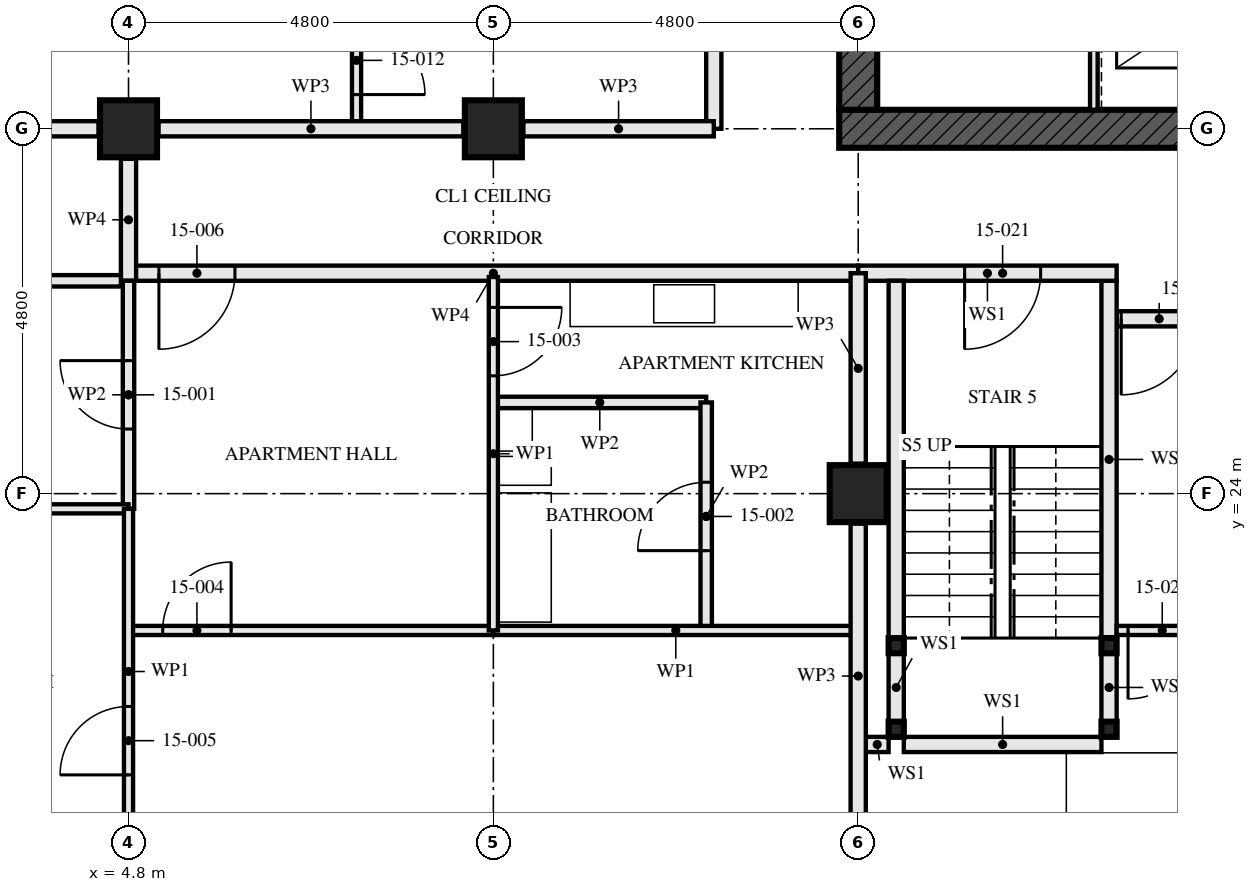
"""IFC4 building model, lengths in metres.
Left out: names, types, materials, properties, quantities, classifications, styles, units other than length and angle.
Written with IfcOpenShell. Run it as: python <this file> out.ifc"""

import sys

from ifc_helpers import new_model, si_unit, direction, frame, frame_2d, origin, origin_2d, place, context, subcontext, project, spatial, rectangle, hollow_rectangle, extrude, element, fill, save


model = new_model("IFC4")
c1 = context("Model", 3, precision=1e-05, world=origin(), true_north=direction((0.0, 1.0)))
c2 = subcontext(c1, "Body", "Model", "MODEL_VIEW")
j1 = project(units=[si_unit("LENGTHUNIT", "METRE"), si_unit("PLANEANGLEUNIT", "RADIAN")], contexts=[c1])
p1 = place(None, origin())
s1 = spatial("IfcSite", under=j1, at=p1, CompositionType="ELEMENT")
p2 = place(p1, origin())
s2 = spatial("IfcBuilding", under=s1, at=p2, CompositionType="ELEMENT")
p3 = place(p2, frame((0.0, 0.0, 58.5)))
s3 = spatial("IfcBuildingStorey", under=s2, at=p3, CompositionType="ELEMENT", Elevation=58.5)
for number, where, z_axis, x_axis in (
    (1, (4.8, 28.8, 0.0), (0.0, 0.0, 1.0), (0.0, 1.0, 0.0)),
    (2, (9.6, 28.8, 0.0), (0.0, 0.0, 1.0), (0.0, 1.0, 0.0)),
    (3, (14.4, 24.0, 0.0), (0.0, 0.0, 1.0), (1.0, 0.0, 0.0)),
):
    element("IfcColumn", number, at=place(p3, frame(where, z_axis=z_axis, x_axis=x_axis)), inside=s3, PredefinedType="COLUMN", context=c2, shape_type="SweptSolid", body=[
        extrude(hollow_rectangle(XDim=0.75, YDim=0.75, WallThickness=0.08, at=origin_2d()), origin(), (0.0, 0.0, 1.0), 3.5),
    ])
p4 = place(p3, frame((14.15, 28.8, -0.17), z_axis=(0.0, 0.0, 1.0), x_axis=(1.0, 0.0, 0.0)))
e4 = element("IfcWall", 4, at=p4, inside=s3, PredefinedType="SHEAR", context=c2, shape_type="SweptSolid", body=[
    extrude(rectangle(XDim=14.9, YDim=0.5, at=frame_2d((7.45, 0.0))), origin(), (0.0, 0.0, 1.0), 3.5),
])
p5 = place(p4, frame((6.85, 0.0, 0.17)))
e5 = element("IfcOpeningElement", 5, at=p5, cuts=e4, PredefinedType="OPENING", context=c2, shape_type="SweptSolid", body=[
    extrude(rectangle(XDim=1.2, YDim=2.1, at=frame_2d((0.6, 1.05))), frame((0.0, 0.26, 0.0), z_axis=(0.0, -1.0, 0.0), x_axis=(1.0, 0.0, 0.0)), (0.0, 0.0, 1.0), 0.521),
])
p6 = place(p3, frame((14.4, 42.95, -0.17), z_axis=(0.0, 0.0, 1.0), x_axis=(0.0, -1.0, 0.0)))
e6 = element("IfcWall", 6, at=p6, inside=s3, PredefinedType="SHEAR", context=c2, shape_type="SweptSolid", body=[
    extrude(rectangle(XDim=13.9, YDim=0.5, at=frame_2d((6.95, 0.0))), origin(), (0.0, 0.0, 1.0), 3.5),
])
p7 = place(p6, frame((6.35, 0.0, 0.17)))
e7 = element("IfcOpeningElement", 7, at=p7, cuts=e6, PredefinedType="OPENING", context=c2, shape_type="SweptSolid", body=[
    extrude(rectangle(XDim=1.2, YDim=2.1, at=frame_2d((0.6, 1.05))), frame((0.0, 0.26, 0.0), z_axis=(0.0, -1.0, 0.0), x_axis=(1.0, 0.0, 0.0)), (0.0, 0.0, 1.0), 0.521),
])
for number, where, z_axis, x_axis in (
    (8, (14.9, 20.9, 0.0), (0.0, 0.0, 1.0), (1.0, 0.0, 0.0)),
    (9, (17.7, 20.9, 0.0), (0.0, 0.0, 1.0), (1.0, 0.0, 0.0)),
    (10, (14.9, 22.0, 0.0), (0.0, 0.0, 1.0), (1.0, 0.0, 0.0)),
    (11, (17.7, 22.0, 0.0), (0.0, 0.0, 1.0), (1.0, 0.0, 0.0)),
):
    element("IfcColumn", number, at=place(p3, frame(where, z_axis=z_axis, x_axis=x_axis)), inside=s3, PredefinedType="COLUMN", context=c2, shape_type="SweptSolid", body=[
        extrude(hollow_rectangle(XDim=0.2, YDim=0.2, WallThickness=0.008, at=origin_2d()), origin(), (0.0, 0.0, 1.0), 3.33),
    ])
p8 = place(p3, frame((4.8, 23.8, 0.0), z_axis=(0.0, 0.0, 1.0), x_axis=(0.0, 1.0, 0.0)))
e12 = element("IfcWall", 12, at=p8, inside=s3, PredefinedType="PARTITIONING", context=c2, shape_type="SweptSolid", body=[
    extrude(rectangle(XDim=3.0, YDim=0.15, at=frame_2d((1.5, 0.0))), origin(), (0.0, 0.0, 1.0), 2.55),
])
p9 = place(p8, frame((1.05, 0.0, 0.0)))
e13 = element("IfcOpeningElement", 13, at=p9, cuts=e12, PredefinedType="OPENING", context=c2, shape_type="SweptSolid", body=[
    extrude(rectangle(XDim=0.9, YDim=2.1, at=frame_2d((0.45, 1.05))), frame((0.0, 0.085, 0.0), z_axis=(0.0, -1.0, 0.0), x_axis=(1.0, 0.0, 0.0)), (0.0, 0.0, 1.0), 0.171),
])
p10 = place(p3, frame((12.4, 22.2, 0.0), z_axis=(0.0, 0.0, 1.0), x_axis=(0.0, 1.0, 0.0)))
e14 = element("IfcWall", 14, at=p10, inside=s3, PredefinedType="PARTITIONING", context=c2, shape_type="SweptSolid", body=[
    extrude(rectangle(XDim=3.0, YDim=0.15, at=frame_2d((1.5, 0.0))), origin(), (0.0, 0.0, 1.0), 2.55),
])
p11 = place(p10, frame((1.05, 0.0, 0.0)))
e15 = element("IfcOpeningElement", 15, at=p11, cuts=e14, PredefinedType="OPENING", context=c2, shape_type="SweptSolid", body=[
    extrude(rectangle(XDim=0.9, YDim=2.1, at=frame_2d((0.45, 1.05))), frame((0.0, 0.085, 0.0), z_axis=(0.0, -1.0, 0.0), x_axis=(1.0, 0.0, 0.0)), (0.0, 0.0, 1.0), 0.171),
])
p12 = place(p3, frame((9.6, 25.2, 0.0), z_axis=(0.0, 0.0, 1.0), x_axis=(1.0, 0.0, 0.0)))
e16 = element("IfcWall", 16, at=p12, inside=s3, PredefinedType="PARTITIONING", context=c2, shape_type="SweptSolid", body=[
    extrude(rectangle(XDim=2.8, YDim=0.15, at=frame_2d((1.4, 0.0))), origin(), (0.0, 0.0, 1.0), 3.33),
])
p13 = place(p3, frame((9.6, 22.2, 0.0), z_axis=(0.0, 0.0, 1.0), x_axis=(0.0, 1.0, 0.0)))
e17 = element("IfcWall", 17, at=p13, inside=s3, PredefinedType="PARTITIONING", context=c2, shape_type="SweptSolid", body=[
    extrude(rectangle(XDim=4.65, YDim=0.12, at=frame_2d((2.325, 0.0))), origin(), (0.0, 0.0, 1.0), 2.55),
])
p14 = place(p13, frame((3.35, 0.0, 0.0)))
e18 = element("IfcOpeningElement", 18, at=p14, cuts=e17, PredefinedType="OPENING", context=c2, shape_type="SweptSolid", body=[
    extrude(rectangle(XDim=0.9, YDim=2.1, at=frame_2d((0.45, 1.05))), frame((0.0, 0.071, 0.0), z_axis=(0.0, -1.0, 0.0), x_axis=(1.0, 0.0, 0.0)), (0.0, 0.0, 1.0), 0.141),
])
p15 = place(p3, frame((0.244, 23.8, 0.0), z_axis=(0.0, 0.0, 1.0), x_axis=(1.0, 0.0, 0.0)))
e19 = element("IfcWall", 19, at=p15, inside=s3, PredefinedType="PARTITIONING", context=c2, shape_type="SweptSolid", body=[
    extrude(rectangle(XDim=4.556, YDim=0.12, at=frame_2d((2.278, 0.0))), origin(), (0.0, 0.0, 1.0), 3.33),
])
p16 = place(p3, frame((4.8, 22.2, 0.0), z_axis=(0.0, 0.0, 1.0), x_axis=(1.0, 0.0, 0.0)))
e20 = element("IfcWall", 20, at=p16, inside=s3, PredefinedType="PARTITIONING", context=c2, shape_type="SweptSolid", body=[
    extrude(rectangle(XDim=4.8, YDim=0.12, at=frame_2d((2.4, 0.0))), origin(), (0.0, 0.0, 1.0), 3.33),
])
p17 = place(p16, frame((0.45, 0.0, 0.0)))
e21 = element("IfcOpeningElement", 21, at=p17, cuts=e20, PredefinedType="OPENING", context=c2, shape_type="SweptSolid", body=[
    extrude(rectangle(XDim=0.9, YDim=2.1, at=frame_2d((0.45, 1.05))), frame((0.0, 0.071, 0.0), z_axis=(0.0, -1.0, 0.0), x_axis=(1.0, 0.0, 0.0)), (0.0, 0.0, 1.0), 0.141),
])
p18 = place(p3, frame((9.6, 22.2, 0.0), z_axis=(0.0, 0.0, 1.0), x_axis=(1.0, 0.0, 0.0)))
e22 = element("IfcWall", 22, at=p18, inside=s3, PredefinedType="PARTITIONING", context=c2, shape_type="SweptSolid", body=[
    extrude(rectangle(XDim=4.8, YDim=0.12, at=frame_2d((2.4, 0.0))), origin(), (0.0, 0.0, 1.0), 3.33),
])
p19 = place(p3, frame((4.8, 19.52, 0.0), z_axis=(0.0, 0.0, 1.0), x_axis=(0.0, 1.0, 0.0)))
e23 = element("IfcWall", 23, at=p19, inside=s3, PredefinedType="PARTITIONING", context=c2, shape_type="SweptSolid", body=[
    extrude(rectangle(XDim=4.28, YDim=0.12, at=frame_2d((2.14, 0.0))), origin(), (0.0, 0.0, 1.0), 3.33),
])
p20 = place(p19, frame((0.78, 0.0, 0.0)))
e24 = element("IfcOpeningElement", 24, at=p20, cuts=e23, PredefinedType="OPENING", context=c2, shape_type="SweptSolid", body=[
    extrude(rectangle(XDim=0.9, YDim=2.1, at=frame_2d((0.45, 1.05))), frame((0.0, 0.071, 0.0), z_axis=(0.0, -1.0, 0.0), x_axis=(1.0, 0.0, 0.0)), (0.0, 0.0, 1.0), 0.141),
])
p21 = place(p3, frame((4.8, 26.9, 0.0), z_axis=(0.0, 0.0, 1.0), x_axis=(1.0, 0.0, 0.0)))
e25 = element("IfcWall", 25, at=p21, inside=s3, PredefinedType="PARTITIONING", context=c2, shape_type="SweptSolid", body=[
    extrude(rectangle(XDim=9.6, YDim=0.2, at=frame_2d((4.8, 0.0))), origin(), (0.0, 0.0, 1.0), 3.33),
])
p22 = place(p21, frame((0.4, 0.0, 0.0)))
e26 = element("IfcOpeningElement", 26, at=p22, cuts=e25, PredefinedType="OPENING", context=c2, shape_type="SweptSolid", body=[
    extrude(rectangle(XDim=1.0, YDim=2.1, at=frame_2d((0.5, 1.05))), frame((0.0, 0.111, 0.0), z_axis=(0.0, -1.0, 0.0), x_axis=(1.0, 0.0, 0.0)), (0.0, 0.0, 1.0), 0.221),
])
p23 = place(p3, frame((4.8, 26.8, 0.0), z_axis=(0.0, 0.0, 1.0), x_axis=(0.0, 1.0, 0.0)))
e27 = element("IfcWall", 27, at=p23, inside=s3, PredefinedType="PARTITIONING", context=c2, shape_type="SweptSolid", body=[
    extrude(rectangle(XDim=1.605, YDim=0.2, at=frame_2d((0.802, 0.0))), origin(), (0.0, 0.0, 1.0), 3.33),
])
p24 = place(p3, frame((7.8, 33.6, 0.0), z_axis=(0.0, 0.0, 1.0), x_axis=(0.0, -1.0, 0.0)))
e28 = element("IfcWall", 28, at=p24, inside=s3, PredefinedType="PARTITIONING", context=c2, shape_type="SweptSolid", body=[
    extrude(rectangle(XDim=4.8, YDim=0.12, at=frame_2d((2.4, 0.0))), origin(), (0.0, 0.0, 1.0), 3.33),
])
p25 = place(p24, frame((3.45, 0.0, 0.0)))
e29 = element("IfcOpeningElement", 29, at=p25, cuts=e28, PredefinedType="OPENING", context=c2, shape_type="SweptSolid", body=[
    extrude(rectangle(XDim=0.9, YDim=2.1, at=frame_2d((0.45, 1.05))), frame((0.0, 0.071, 0.0), z_axis=(0.0, -1.0, 0.0), x_axis=(1.0, 0.0, 0.0)), (0.0, 0.0, 1.0), 0.141),
])
p26 = place(p3, frame((12.5, 43.2, 0.0), z_axis=(0.0, 0.0, 1.0), x_axis=(0.0, -1.0, 0.0)))
e30 = element("IfcWall", 30, at=p26, inside=s3, PredefinedType="PARTITIONING", context=c2, shape_type="SweptSolid", body=[
    extrude(rectangle(XDim=14.4, YDim=0.2, at=frame_2d((7.2, 0.0))), origin(), (0.0, 0.0, 1.0), 2.55),
])
p27 = place(p26, frame((1.4, 0.0, 0.0)))
e31 = element("IfcOpeningElement", 31, at=p27, cuts=e30, PredefinedType="OPENING", context=c2, shape_type="SweptSolid", body=[
    extrude(rectangle(XDim=1.0, YDim=2.1, at=frame_2d((0.5, 1.05))), frame((0.0, 0.111, 0.0), z_axis=(0.0, -1.0, 0.0), x_axis=(1.0, 0.0, 0.0)), (0.0, 0.0, 1.0), 0.221),
])
p28 = place(p26, frame((10.0, 0.0, 0.0)))
e32 = element("IfcOpeningElement", 32, at=p28, cuts=e30, PredefinedType="OPENING", context=c2, shape_type="SweptSolid", body=[
    extrude(rectangle(XDim=1.0, YDim=2.1, at=frame_2d((0.5, 1.05))), frame((0.0, 0.111, 0.0), z_axis=(0.0, -1.0, 0.0), x_axis=(1.0, 0.0, 0.0)), (0.0, 0.0, 1.0), 0.221),
])
p29 = place(p3, frame((14.9, 21.0, 0.0), z_axis=(0.0, 0.0, 1.0), x_axis=(0.0, 1.0, 0.0)))
e33 = element("IfcWall", 33, at=p29, inside=s3, PredefinedType="SOLIDWALL", context=c2, shape_type="SweptSolid", body=[
    extrude(rectangle(XDim=0.9, YDim=0.2, at=frame_2d((0.45, 0.0))), origin(), (0.0, 0.0, 1.0), 2.99),
])
p30 = place(p3, frame((14.9, 22.1, 0.0), z_axis=(0.0, 0.0, 1.0), x_axis=(0.0, 1.0, 0.0)))
e34 = element("IfcWall", 34, at=p30, inside=s3, PredefinedType="SOLIDWALL", context=c2, shape_type="SweptSolid", body=[
    extrude(rectangle(XDim=4.7, YDim=0.2, at=frame_2d((2.35, 0.0))), origin(), (0.0, 0.0, 1.0), 2.99),
])
p31 = place(p3, frame((17.7, 21.0, 0.0), z_axis=(0.0, 0.0, 1.0), x_axis=(0.0, 1.0, 0.0)))
e35 = element("IfcWall", 35, at=p31, inside=s3, PredefinedType="SOLIDWALL", context=c2, shape_type="SweptSolid", body=[
    extrude(rectangle(XDim=0.9, YDim=0.2, at=frame_2d((0.45, 0.0))), origin(), (0.0, 0.0, 1.0), 2.99),
])
p32 = place(p3, frame((17.7, 22.1, 0.0), z_axis=(0.0, 0.0, 1.0), x_axis=(0.0, 1.0, 0.0)))
e36 = element("IfcWall", 36, at=p32, inside=s3, PredefinedType="SOLIDWALL", context=c2, shape_type="SweptSolid", body=[
    extrude(rectangle(XDim=4.7, YDim=0.2, at=frame_2d((2.35, 0.0))), origin(), (0.0, 0.0, 1.0), 2.99),
])
p33 = place(p3, frame((14.5, 20.7, 0.0), z_axis=(0.0, 0.0, 1.0), x_axis=(1.0, 0.0, 0.0)))
e37 = element("IfcWall", 37, at=p33, inside=s3, PredefinedType="SOLIDWALL", context=c2, shape_type="SweptSolid", body=[
    extrude(rectangle(XDim=0.3, YDim=0.2, at=frame_2d((0.15, 0.0))), origin(), (0.0, 0.0, 1.0), 3.33),
])
p34 = place(p3, frame((15.0, 20.7, 0.0), z_axis=(0.0, 0.0, 1.0), x_axis=(1.0, 0.0, 0.0)))
e38 = element("IfcWall", 38, at=p34, inside=s3, PredefinedType="SOLIDWALL", context=c2, shape_type="SweptSolid", body=[
    extrude(rectangle(XDim=2.6, YDim=0.2, at=frame_2d((1.3, 0.0))), origin(), (0.0, 0.0, 1.0), 3.33),
])
p35 = place(p3, frame((14.4, 26.9, 0.0), z_axis=(0.0, 0.0, 1.0), x_axis=(1.0, 0.0, 0.0)))
e39 = element("IfcWall", 39, at=p35, inside=s3, PredefinedType="SOLIDWALL", context=c2, shape_type="SweptSolid", body=[
    extrude(rectangle(XDim=3.4, YDim=0.2, at=frame_2d((1.7, 0.0))), origin(), (0.0, 0.0, 1.0), 3.33),
])
p36 = place(p35, frame((1.4, 0.0, 0.0)))
e40 = element("IfcOpeningElement", 40, at=p36, cuts=e39, PredefinedType="OPENING", context=c2, shape_type="SweptSolid", body=[
    extrude(rectangle(XDim=1.0, YDim=2.1, at=frame_2d((0.5, 1.05))), frame((0.0, 0.111, 0.0), z_axis=(0.0, -1.0, 0.0), x_axis=(1.0, 0.0, 0.0)), (0.0, 0.0, 1.0), 0.221),
])
p37 = place(p3, frame((17.8, 22.2, 0.0), z_axis=(0.0, 0.0, 1.0), x_axis=(1.0, 0.0, 0.0)))
e41 = element("IfcWall", 41, at=p37, inside=s3, PredefinedType="PARTITIONING", context=c2, shape_type="SweptSolid", body=[
    extrude(rectangle(XDim=1.4, YDim=0.12, at=frame_2d((0.7, 0.0))), origin(), (0.0, 0.0, 1.0), 3.33),
])
p38 = place(p37, frame((0.15, 0.0, 0.0)))
e42 = element("IfcOpeningElement", 42, at=p38, cuts=e41, PredefinedType="OPENING", context=c2, shape_type="SweptSolid", body=[
    extrude(rectangle(XDim=0.9, YDim=2.1, at=frame_2d((0.45, 1.05))), frame((0.0, 0.071, 0.0), z_axis=(0.0, -1.0, 0.0), x_axis=(1.0, 0.0, 0.0)), (0.0, 0.0, 1.0), 0.141),
])
p39 = place(p3, frame((17.8, 26.3, 0.0), z_axis=(0.0, 0.0, 1.0), x_axis=(1.0, 0.0, 0.0)))
e43 = element("IfcWall", 43, at=p39, inside=s3, PredefinedType="PARTITIONING", context=c2, shape_type="SweptSolid", body=[
    extrude(rectangle(XDim=11.0, YDim=0.2, at=frame_2d((5.5, 0.0))), origin(), (0.0, 0.0, 1.0), 2.55),
])
p40 = place(p39, frame((0.06, 0.0, 0.0)))
e44 = element("IfcOpeningElement", 44, at=p40, cuts=e43, PredefinedType="OPENING", context=c2, shape_type="SweptSolid", body=[
    extrude(rectangle(XDim=1.0, YDim=2.1, at=frame_2d((0.5, 1.05))), frame((0.0, 0.111, 0.0), z_axis=(0.0, -1.0, 0.0), x_axis=(1.0, 0.0, 0.0)), (0.0, 0.0, 1.0), 0.221),
])
p41 = place(p3, frame((17.5, 29.05, 0.0), z_axis=(0.0, 0.0, 1.0), x_axis=(0.0, 1.0, 0.0)))
e45 = element("IfcWall", 45, at=p41, inside=s3, PredefinedType="SOLIDWALL", context=c2, shape_type="SweptSolid", body=[
    extrude(rectangle(XDim=5.8, YDim=0.1, at=frame_2d((2.9, 0.0))), origin(), (0.0, 0.0, 1.0), 3.33),
])
p42 = place(p3, frame((12.5, 28.8, 0.0), z_axis=(0.0, 0.0, 1.0), x_axis=(-1.0, 0.0, 0.0)))
e46 = element("IfcWall", 46, at=p42, inside=s3, PredefinedType="PARTITIONING", context=c2, shape_type="SweptSolid", body=[
    extrude(rectangle(XDim=2.505, YDim=0.2, at=frame_2d((1.252, 0.0))), origin(), (0.0, 0.0, 1.0), 2.32),
])
p43 = place(p3, frame((9.205, 28.8, 0.0), z_axis=(0.0, 0.0, 1.0), x_axis=(-1.0, 0.0, 0.0)))
e47 = element("IfcWall", 47, at=p43, inside=s3, PredefinedType="PARTITIONING", context=c2, shape_type="SweptSolid", body=[
    extrude(rectangle(XDim=4.01, YDim=0.2, at=frame_2d((2.005, 0.0))), origin(), (0.0, 0.0, 1.0), 2.32),
])
p44 = place(p3, frame((4.405, 28.8, 0.0), z_axis=(0.0, 0.0, 1.0), x_axis=(-1.0, 0.0, 0.0)))
e48 = element("IfcWall", 48, at=p44, inside=s3, PredefinedType="PARTITIONING", context=c2, shape_type="SweptSolid", body=[
    extrude(rectangle(XDim=4.11, YDim=0.2, at=frame_2d((2.055, 0.0))), origin(), (0.0, 0.0, 1.0), 2.32),
])
p45 = place(p3, frame((14.4, 19.595, 0.0), z_axis=(0.0, 0.0, 1.0), x_axis=(0.0, 1.0, 0.0)))
e49 = element("IfcWall", 49, at=p45, inside=s3, PredefinedType="PARTITIONING", context=c2, shape_type="SweptSolid", body=[
    extrude(rectangle(XDim=4.01, YDim=0.2, at=frame_2d((2.005, 0.0))), origin(), (0.0, 0.0, 1.0), 2.32),
])
p46 = place(p3, frame((14.4, 24.395, 0.0), z_axis=(0.0, 0.0, 1.0), x_axis=(0.0, 1.0, 0.0)))
e50 = element("IfcWall", 50, at=p46, inside=s3, PredefinedType="PARTITIONING", context=c2, shape_type="SweptSolid", body=[
    extrude(rectangle(XDim=2.505, YDim=0.2, at=frame_2d((1.252, 0.0))), origin(), (0.0, 0.0, 1.0), 2.32),
])
p47 = place(p3, frame((-0.43, 26.8, 0.0), z_axis=(0.0, 0.0, 1.0), x_axis=(1.0, 0.0, 0.0)))
e51 = element("IfcWall", 51, at=p47, inside=s3, PredefinedType="PARTITIONING", context=c2, shape_type="SweptSolid", body=[
    extrude(rectangle(XDim=5.13, YDim=0.15, at=frame_2d((2.565, 0.0))), origin(), (0.0, 0.0, 1.0), 2.32),
])
p48 = place(p9, origin())
e52 = element("IfcDoor", 52, at=p48, inside=s3, OperationType="SINGLE_SWING_LEFT", PredefinedType="DOOR", context=c2, shape_type="SweptSolid", body=[
    extrude(rectangle(XDim=0.9, YDim=2.1, at=frame_2d((0.45, 1.05))), frame((0.0, 0.022, 0.0), z_axis=(0.0, -1.0, 0.0), x_axis=(1.0, 0.0, 0.0)), (0.0, 0.0, 1.0), 0.044),
])
fill(e13, e52)
p49 = place(p11, origin())
e53 = element("IfcDoor", 53, at=p49, inside=s3, OperationType="SINGLE_SWING_RIGHT", PredefinedType="DOOR", context=c2, shape_type="SweptSolid", body=[
    extrude(rectangle(XDim=0.9, YDim=2.1, at=frame_2d((0.45, 1.05))), frame((0.0, 0.022, 0.0), z_axis=(0.0, -1.0, 0.0), x_axis=(1.0, 0.0, 0.0)), (0.0, 0.0, 1.0), 0.044),
])
fill(e15, e53)
p50 = place(p14, frame((0.9, 0.0, 0.0), z_axis=(0.0, 0.0, 1.0), x_axis=(-1.0, 0.0, 0.0)))
e54 = element("IfcDoor", 54, at=p50, inside=s3, OperationType="SINGLE_SWING_RIGHT", PredefinedType="DOOR", context=c2, shape_type="SweptSolid", body=[
    extrude(rectangle(XDim=0.9, YDim=2.1, at=frame_2d((0.45, 1.05))), frame((0.0, 0.022, 0.0), z_axis=(0.0, -1.0, 0.0), x_axis=(1.0, 0.0, 0.0)), (0.0, 0.0, 1.0), 0.044),
])
fill(e18, e54)
p51 = place(p17, origin())
e55 = element("IfcDoor", 55, at=p51, inside=s3, OperationType="SINGLE_SWING_LEFT", PredefinedType="DOOR", context=c2, shape_type="SweptSolid", body=[
    extrude(rectangle(XDim=0.9, YDim=2.1, at=frame_2d((0.45, 1.05))), frame((0.0, 0.022, 0.0), z_axis=(0.0, -1.0, 0.0), x_axis=(1.0, 0.0, 0.0)), (0.0, 0.0, 1.0), 0.044),
])
fill(e21, e55)
p52 = place(p20, origin())
e56 = element("IfcDoor", 56, at=p52, inside=s3, OperationType="SINGLE_SWING_RIGHT", PredefinedType="DOOR", context=c2, shape_type="SweptSolid", body=[
    extrude(rectangle(XDim=0.9, YDim=2.1, at=frame_2d((0.45, 1.05))), frame((0.0, 0.022, 0.0), z_axis=(0.0, -1.0, 0.0), x_axis=(1.0, 0.0, 0.0)), (0.0, 0.0, 1.0), 0.044),
])
fill(e24, e56)
p53 = place(p22, frame((1.0, 0.0, 0.0), z_axis=(0.0, 0.0, 1.0), x_axis=(-1.0, 0.0, 0.0)))
e57 = element("IfcDoor", 57, at=p53, inside=s3, OperationType="SINGLE_SWING_LEFT", PredefinedType="DOOR", context=c2, shape_type="SweptSolid", body=[
    extrude(rectangle(XDim=1.0, YDim=2.1, at=frame_2d((0.5, 1.05))), frame((0.0, 0.027, 0.0), z_axis=(0.0, -1.0, 0.0), x_axis=(1.0, 0.0, 0.0)), (0.0, 0.0, 1.0), 0.054),
])
fill(e26, e57)
p54 = place(p25, origin())
e58 = element("IfcDoor", 58, at=p54, inside=s3, OperationType="SINGLE_SWING_LEFT", PredefinedType="DOOR", context=c2, shape_type="SweptSolid", body=[
    extrude(rectangle(XDim=0.9, YDim=2.1, at=frame_2d((0.45, 1.05))), frame((0.0, 0.022, 0.0), z_axis=(0.0, -1.0, 0.0), x_axis=(1.0, 0.0, 0.0)), (0.0, 0.0, 1.0), 0.044),
])
fill(e29, e58)
p55 = place(p36, frame((1.0, 0.0, 0.0), z_axis=(0.0, 0.0, 1.0), x_axis=(-1.0, 0.0, 0.0)))
e59 = element("IfcDoor", 59, at=p55, inside=s3, OperationType="SINGLE_SWING_LEFT", PredefinedType="DOOR", context=c2, shape_type="SweptSolid", body=[
    extrude(rectangle(XDim=1.0, YDim=2.1, at=frame_2d((0.5, 1.05))), frame((0.0, 0.032, 0.0), z_axis=(0.0, -1.0, 0.0), x_axis=(1.0, 0.0, 0.0)), (0.0, 0.0, 1.0), 0.064),
])
fill(e40, e59)
p56 = place(p38, frame((0.9, 0.0, 0.0), z_axis=(0.0, 0.0, 1.0), x_axis=(-1.0, 0.0, 0.0)))
e60 = element("IfcDoor", 60, at=p56, inside=s3, OperationType="SINGLE_SWING_LEFT", PredefinedType="DOOR", context=c2, shape_type="SweptSolid", body=[
    extrude(rectangle(XDim=0.9, YDim=2.1, at=frame_2d((0.45, 1.05))), frame((0.0, 0.022, 0.0), z_axis=(0.0, -1.0, 0.0), x_axis=(1.0, 0.0, 0.0)), (0.0, 0.0, 1.0), 0.044),
])
fill(e42, e60)
p57 = place(p40, frame((1.0, 0.0, 0.0), z_axis=(0.0, 0.0, 1.0), x_axis=(-1.0, 0.0, 0.0)))
e61 = element("IfcDoor", 61, at=p57, inside=s3, OperationType="SINGLE_SWING_LEFT", PredefinedType="DOOR", context=c2, shape_type="SweptSolid", body=[
    extrude(rectangle(XDim=1.0, YDim=2.1, at=frame_2d((0.5, 1.05))), frame((0.0, 0.027, 0.0), z_axis=(0.0, -1.0, 0.0), x_axis=(1.0, 0.0, 0.0)), (0.0, 0.0, 1.0), 0.054),
])
fill(e44, e61)
save(model, sys.argv[1])
